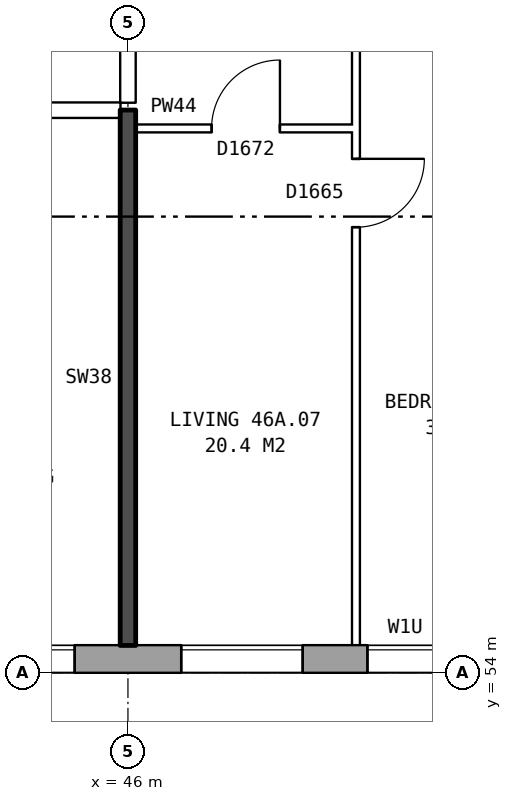
"""IFC4 building model, lengths in metres.
Left out: names, types, materials, properties, quantities, classifications, styles, units other than length and angle.
Written with IfcOpenShell. Run it as: python <this file> out.ifc"""

import sys

from ifc_helpers import new_model, si_unit, direction, frame, frame_2d, origin, place, context, subcontext, project, spatial, rectangle, extrude, element, fill, save


model = new_model("IFC4")
c1 = context("Model", 3, precision=1e-05, world=origin(), true_north=direction((0.0, 1.0)))
c2 = subcontext(c1, "Body", "Model", "MODEL_VIEW")
j1 = project(units=[si_unit("LENGTHUNIT", "METRE"), si_unit("PLANEANGLEUNIT", "RADIAN")], contexts=[c1])
p1 = place(None, origin())
s1 = spatial("IfcSite", under=j1, at=p1, CompositionType="ELEMENT")
p2 = place(p1, origin())
s2 = spatial("IfcBuilding", under=s1, at=p2, CompositionType="ELEMENT")
p3 = place(p2, frame((0.0, 0.0, 164.0)))
s3 = spatial("IfcBuildingStorey", under=s2, at=p3, CompositionType="ELEMENT", Elevation=164.0)
p4 = place(p3, frame((31.575, 54.18, 0.0), z_axis=(0.0, 0.0, 1.0), x_axis=(1.0, 0.0, 0.0)))
e1 = element("IfcWall", 1, at=p4, inside=s3, PredefinedType="STANDARD", context=c2, shape_type="SweptSolid", body=[
    extrude(rectangle(XDim=41.351, YDim=0.36, at=frame_2d((20.675, 0.0))), origin(), (0.0, 0.0, 1.0), 2.85),
])
p5 = place(p4, frame((3.125, 0.0, 0.8)))
e2 = element("IfcOpeningElement", 2, at=p5, cuts=e1, PredefinedType="OPENING", context=c2, shape_type="SweptSolid", body=[
    extrude(rectangle(XDim=1.6, YDim=1.8, at=frame_2d((0.8, 0.9))), frame((0.0, 0.19, 0.0), z_axis=(0.0, -1.0, 0.0), x_axis=(1.0, 0.0, 0.0)), (0.0, 0.0, 1.0), 0.38),
])
p6 = place(p4, frame((6.125, 0.0, 0.8)))
e3 = element("IfcOpeningElement", 3, at=p6, cuts=e1, PredefinedType="OPENING", context=c2, shape_type="SweptSolid", body=[
    extrude(rectangle(XDim=1.6, YDim=1.8, at=frame_2d((0.8, 0.9))), frame((0.0, 0.19, 0.0), z_axis=(0.0, -1.0, 0.0), x_axis=(1.0, 0.0, 0.0)), (0.0, 0.0, 1.0), 0.38),
])
p7 = place(p4, frame((9.125, 0.0, 0.8)))
e4 = element("IfcOpeningElement", 4, at=p7, cuts=e1, PredefinedType="OPENING", context=c2, shape_type="SweptSolid", body=[
    extrude(rectangle(XDim=1.6, YDim=1.8, at=frame_2d((0.8, 0.9))), frame((0.0, 0.19, 0.0), z_axis=(0.0, -1.0, 0.0), x_axis=(1.0, 0.0, 0.0)), (0.0, 0.0, 1.0), 0.38),
])
p8 = place(p4, frame((12.125, 0.0, 0.8)))
e5 = element("IfcOpeningElement", 5, at=p8, cuts=e1, PredefinedType="OPENING", context=c2, shape_type="SweptSolid", body=[
    extrude(rectangle(XDim=1.6, YDim=1.8, at=frame_2d((0.8, 0.9))), frame((0.0, 0.19, 0.0), z_axis=(0.0, -1.0, 0.0), x_axis=(1.0, 0.0, 0.0)), (0.0, 0.0, 1.0), 0.38),
])
p9 = place(p4, frame((15.125, 0.0, 0.8)))
e6 = element("IfcOpeningElement", 6, at=p9, cuts=e1, PredefinedType="OPENING", context=c2, shape_type="SweptSolid", body=[
    extrude(rectangle(XDim=1.6, YDim=1.8, at=frame_2d((0.8, 0.9))), frame((0.0, 0.19, 0.0), z_axis=(0.0, -1.0, 0.0), x_axis=(1.0, 0.0, 0.0)), (0.0, 0.0, 1.0), 0.38),
])
p10 = place(p4, frame((17.575, 0.0, 1.55)))
e7 = element("IfcOpeningElement", 7, at=p10, cuts=e1, PredefinedType="OPENING", context=c2, shape_type="SweptSolid", body=[
    extrude(rectangle(XDim=1.0, YDim=0.9, at=frame_2d((0.5, 0.45))), frame((0.0, 0.19, 0.0), z_axis=(0.0, -1.0, 0.0), x_axis=(1.0, 0.0, 0.0)), (0.0, 0.0, 1.0), 0.38),
])
p11 = place(p4, frame((20.625, 0.0, 0.25)))
e8 = element("IfcOpeningElement", 8, at=p11, cuts=e1, PredefinedType="OPENING", context=c2, shape_type="SweptSolid", body=[
    extrude(rectangle(XDim=0.6, YDim=1.5, at=frame_2d((0.3, 0.75))), frame((0.0, 0.19, 0.0), z_axis=(0.0, -1.0, 0.0), x_axis=(1.0, 0.0, 0.0)), (0.0, 0.0, 1.0), 0.38),
])
p12 = place(p4, frame((24.125, 0.0, 0.8)))
e9 = element("IfcOpeningElement", 9, at=p12, cuts=e1, PredefinedType="OPENING", context=c2, shape_type="SweptSolid", body=[
    extrude(rectangle(XDim=1.6, YDim=1.8, at=frame_2d((0.8, 0.9))), frame((0.0, 0.19, 0.0), z_axis=(0.0, -1.0, 0.0), x_axis=(1.0, 0.0, 0.0)), (0.0, 0.0, 1.0), 0.38),
])
p13 = place(p4, frame((27.125, 0.0, 0.8)))
e10 = element("IfcOpeningElement", 10, at=p13, cuts=e1, PredefinedType="OPENING", context=c2, shape_type="SweptSolid", body=[
    extrude(rectangle(XDim=1.6, YDim=1.8, at=frame_2d((0.8, 0.9))), frame((0.0, 0.19, 0.0), z_axis=(0.0, -1.0, 0.0), x_axis=(1.0, 0.0, 0.0)), (0.0, 0.0, 1.0), 0.38),
])
p14 = place(p4, frame((30.125, 0.0, 0.8)))
e11 = element("IfcOpeningElement", 11, at=p14, cuts=e1, PredefinedType="OPENING", context=c2, shape_type="SweptSolid", body=[
    extrude(rectangle(XDim=1.6, YDim=1.8, at=frame_2d((0.8, 0.9))), frame((0.0, 0.19, 0.0), z_axis=(0.0, -1.0, 0.0), x_axis=(1.0, 0.0, 0.0)), (0.0, 0.0, 1.0), 0.38),
])
p15 = place(p4, frame((33.125, 0.0, 0.8)))
e12 = element("IfcOpeningElement", 12, at=p15, cuts=e1, PredefinedType="OPENING", context=c2, shape_type="SweptSolid", body=[
    extrude(rectangle(XDim=1.6, YDim=1.8, at=frame_2d((0.8, 0.9))), frame((0.0, 0.19, 0.0), z_axis=(0.0, -1.0, 0.0), x_axis=(1.0, 0.0, 0.0)), (0.0, 0.0, 1.0), 0.38),
])
p16 = place(p4, frame((36.125, 0.0, 0.8)))
e13 = element("IfcOpeningElement", 13, at=p16, cuts=e1, PredefinedType="OPENING", context=c2, shape_type="SweptSolid", body=[
    extrude(rectangle(XDim=1.6, YDim=1.8, at=frame_2d((0.8, 0.9))), frame((0.0, 0.19, 0.0), z_axis=(0.0, -1.0, 0.0), x_axis=(1.0, 0.0, 0.0)), (0.0, 0.0, 1.0), 0.38),
])
p17 = place(p4, frame((39.125, 0.0, 0.8)))
e14 = element("IfcOpeningElement", 14, at=p17, cuts=e1, PredefinedType="OPENING", context=c2, shape_type="SweptSolid", body=[
    extrude(rectangle(XDim=1.6, YDim=1.8, at=frame_2d((0.8, 0.9))), frame((0.0, 0.19, 0.0), z_axis=(0.0, -1.0, 0.0), x_axis=(1.0, 0.0, 0.0)), (0.0, 0.0, 1.0), 0.38),
])
p18 = place(p4, frame((19.225, 0.0, 0.15)))
e15 = element("IfcOpeningElement", 15, at=p18, cuts=e1, PredefinedType="OPENING", context=c2, shape_type="SweptSolid", body=[
    extrude(rectangle(XDim=1.0, YDim=0.9, at=frame_2d((0.5, 0.45))), frame((0.0, 0.19, 0.0), z_axis=(0.0, -1.0, 0.0), x_axis=(1.0, 0.0, 0.0)), (0.0, 0.0, 1.0), 0.38),
])
p19 = place(p4, frame((21.525, 0.0, 0.15)))
e16 = element("IfcOpeningElement", 16, at=p19, cuts=e1, PredefinedType="OPENING", context=c2, shape_type="SweptSolid", body=[
    extrude(rectangle(XDim=0.6, YDim=0.9, at=frame_2d((0.3, 0.45))), frame((0.0, 0.19, 0.0), z_axis=(0.0, -1.0, 0.0), x_axis=(1.0, 0.0, 0.0)), (0.0, 0.0, 1.0), 0.38),
])
p20 = place(p4, frame((22.625, 0.0, 1.65)))
e17 = element("IfcOpeningElement", 17, at=p20, cuts=e1, PredefinedType="OPENING", context=c2, shape_type="SweptSolid", body=[
    extrude(rectangle(XDim=0.6, YDim=0.9, at=frame_2d((0.3, 0.45))), frame((0.0, 0.19, 0.0), z_axis=(0.0, -1.0, 0.0), x_axis=(1.0, 0.0, 0.0)), (0.0, 0.0, 1.0), 0.38),
])
p21 = place(p3, frame((46.1, 61.16, 0.0), z_axis=(0.0, 0.0, 1.0), x_axis=(1.0, 0.0, 0.0)))
e18 = element("IfcWall", 18, at=p21, inside=s3, PredefinedType="PARTITIONING", context=c2, shape_type="SweptSolid", body=[
    extrude(rectangle(XDim=2.9, YDim=0.1, at=frame_2d((1.45, 0.0))), origin(), (0.0, 0.0, 1.0), 2.85),
])
p22 = place(p21, frame((1.0, 0.0, 0.0)))
e19 = element("IfcOpeningElement", 19, at=p22, cuts=e18, PredefinedType="OPENING", context=c2, shape_type="SweptSolid", body=[
    extrude(rectangle(XDim=0.9, YDim=2.1, at=frame_2d((0.45, 1.05))), frame((0.0, 0.06, 0.0), z_axis=(0.0, -1.0, 0.0), x_axis=(1.0, 0.0, 0.0)), (0.0, 0.0, 1.0), 0.12),
])
p23 = place(p3, frame((28.86, 61.4, 0.0), z_axis=(0.0, 0.0, 1.0), x_axis=(1.0, 0.0, 0.0)))
e20 = element("IfcWall", 20, at=p23, inside=s3, PredefinedType="PARTITIONING", context=c2, shape_type="SweptSolid", body=[
    extrude(rectangle(XDim=17.04, YDim=0.2, at=frame_2d((8.52, 0.0))), origin(), (0.0, 0.0, 1.0), 2.85),
])
p24 = place(p23, frame((14.59, 0.0, 0.0)))
e21 = element("IfcOpeningElement", 21, at=p24, cuts=e20, PredefinedType="OPENING", context=c2, shape_type="SweptSolid", body=[
    extrude(rectangle(XDim=1.0, YDim=2.1, at=frame_2d((0.5, 1.05))), frame((0.0, 0.11, 0.0), z_axis=(0.0, -1.0, 0.0), x_axis=(1.0, 0.0, 0.0)), (0.0, 0.0, 1.0), 0.22),
])
p25 = place(p23, frame((7.64, 0.0, 0.0)))
e22 = element("IfcOpeningElement", 22, at=p25, cuts=e20, PredefinedType="OPENING", context=c2, shape_type="SweptSolid", body=[
    extrude(rectangle(XDim=1.0, YDim=2.1, at=frame_2d((0.5, 1.05))), frame((0.0, 0.11, 0.0), z_axis=(0.0, -1.0, 0.0), x_axis=(1.0, 0.0, 0.0)), (0.0, 0.0, 1.0), 0.22),
])
p26 = place(p3, frame((46.0, 54.36, 0.0), z_axis=(0.0, 0.0, 1.0), x_axis=(0.0, 1.0, 0.0)))
e23 = element("IfcWall", 23, at=p26, inside=s3, PredefinedType="SOLIDWALL", context=c2, shape_type="SweptSolid", body=[
    extrude(rectangle(XDim=7.04, YDim=0.2, at=frame_2d((3.52, 0.0))), origin(), (0.0, 0.0, 1.0), 2.85),
])
p27 = place(p3, frame((46.0, 61.5, 0.0), z_axis=(0.0, 0.0, 1.0), x_axis=(0.0, 1.0, 0.0)))
e24 = element("IfcWall", 24, at=p27, inside=s3, PredefinedType="PARTITIONING", context=c2, shape_type="SweptSolid", body=[
    extrude(rectangle(XDim=2.2, YDim=0.2, at=frame_2d((1.1, 0.0))), origin(), (0.0, 0.0, 1.0), 2.85),
])
p28 = place(p3, frame((49.0, 54.36, 0.0), z_axis=(0.0, 0.0, 1.0), x_axis=(0.0, 1.0, 0.0)))
e25 = element("IfcWall", 25, at=p28, inside=s3, PredefinedType="PARTITIONING", context=c2, shape_type="SweptSolid", body=[
    extrude(rectangle(XDim=14.34, YDim=0.1, at=frame_2d((7.17, 0.0))), origin(), (0.0, 0.0, 1.0), 2.85),
])
p29 = place(p28, frame((5.5, 0.0, 0.0)))
e26 = element("IfcOpeningElement", 26, at=p29, cuts=e25, PredefinedType="OPENING", context=c2, shape_type="SweptSolid", body=[
    extrude(rectangle(XDim=0.9, YDim=2.1, at=frame_2d((0.45, 1.05))), frame((0.0, 0.06, 0.0), z_axis=(0.0, -1.0, 0.0), x_axis=(1.0, 0.0, 0.0)), (0.0, 0.0, 1.0), 0.12),
])
p30 = place(p28, frame((13.04, 0.0, 0.0)))
e27 = element("IfcOpeningElement", 27, at=p30, cuts=e25, PredefinedType="OPENING", context=c2, shape_type="SweptSolid", body=[
    extrude(rectangle(XDim=0.9, YDim=2.1, at=frame_2d((0.45, 1.05))), frame((0.0, 0.06, 0.0), z_axis=(0.0, -1.0, 0.0), x_axis=(1.0, 0.0, 0.0)), (0.0, 0.0, 1.0), 0.12),
])
p31 = place(p8, origin())
e28 = element("IfcWindow", 28, at=p31, inside=s3, PartitioningType="SINGLE_PANEL", PredefinedType="WINDOW", context=c2, shape_type="SweptSolid", body=[
    extrude(rectangle(XDim=1.6, YDim=1.8, at=frame_2d((0.8, 0.9))), frame((0.0, 0.15, 0.0), z_axis=(0.0, -1.0, 0.0), x_axis=(1.0, 0.0, 0.0)), (0.0, 0.0, 1.0), 0.06),
])
fill(e5, e28)
p32 = place(p9, origin())
e29 = element("IfcWindow", 29, at=p32, inside=s3, PartitioningType="SINGLE_PANEL", PredefinedType="WINDOW", context=c2, shape_type="SweptSolid", body=[
    extrude(rectangle(XDim=1.6, YDim=1.8, at=frame_2d((0.8, 0.9))), frame((0.0, 0.15, 0.0), z_axis=(0.0, -1.0, 0.0), x_axis=(1.0, 0.0, 0.0)), (0.0, 0.0, 1.0), 0.06),
])
fill(e6, e29)
p33 = place(p10, origin())
e30 = element("IfcWindow", 30, at=p33, inside=s3, PartitioningType="SINGLE_PANEL", PredefinedType="WINDOW", context=c2, shape_type="SweptSolid", body=[
    extrude(rectangle(XDim=1.0, YDim=0.9, at=frame_2d((0.5, 0.45))), frame((0.0, 0.15, 0.0), z_axis=(0.0, -1.0, 0.0), x_axis=(1.0, 0.0, 0.0)), (0.0, 0.0, 1.0), 0.06),
])
fill(e7, e30)
p34 = place(p29, frame((0.9, 0.0, 0.0), z_axis=(0.0, 0.0, 1.0), x_axis=(-1.0, 0.0, 0.0)))
e31 = element("IfcDoor", 31, at=p34, inside=s3, OperationType="SINGLE_SWING_LEFT", PredefinedType="DOOR", context=c2, shape_type="SweptSolid", body=[
    extrude(rectangle(XDim=0.9, YDim=2.1, at=frame_2d((0.45, 1.05))), frame((0.0, 0.025, 0.0), z_axis=(0.0, -1.0, 0.0), x_axis=(1.0, 0.0, 0.0)), (0.0, 0.0, 1.0), 0.05),
])
fill(e26, e31)
p35 = place(p22, origin())
e32 = element("IfcDoor", 32, at=p35, inside=s3, OperationType="SINGLE_SWING_RIGHT", PredefinedType="DOOR", context=c2, shape_type="SweptSolid", body=[
    extrude(rectangle(XDim=0.9, YDim=2.1, at=frame_2d((0.45, 1.05))), frame((0.0, 0.025, 0.0), z_axis=(0.0, -1.0, 0.0), x_axis=(1.0, 0.0, 0.0)), (0.0, 0.0, 1.0), 0.05),
])
fill(e19, e32)
save(model, sys.argv[1])
